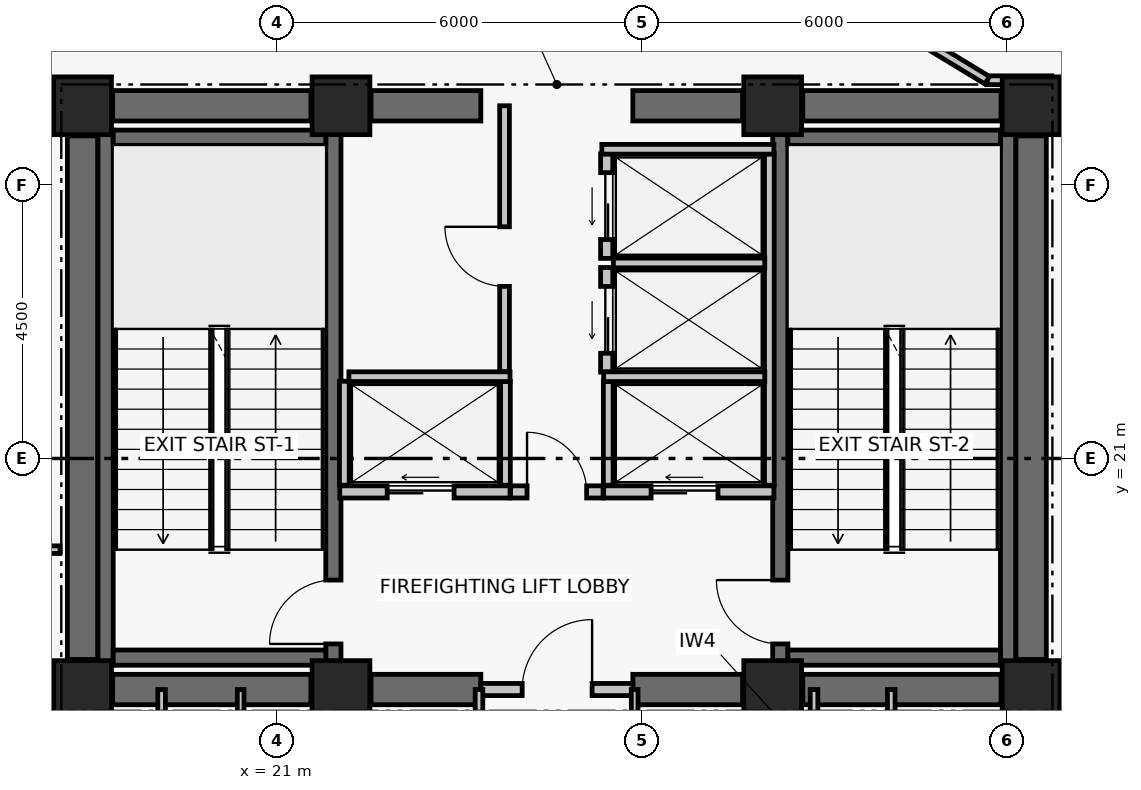
"""IFC4 building model, lengths in metres.
Left out: names, types, materials, properties, quantities, classifications, styles, units other than length and angle.
Written with IfcOpenShell. Run it as: python <this file> out.ifc"""

import sys

from ifc_helpers import new_model, si_unit, direction, frame, frame_2d, origin, origin_2d, place, context, subcontext, project, spatial, rectangle, extrude, element, fill, save


model = new_model("IFC4")
c1 = context("Model", 3, precision=1e-05, world=origin(), true_north=direction((0.0, 1.0)))
c2 = subcontext(c1, "Body", "Model", "MODEL_VIEW")
j1 = project(units=[si_unit("LENGTHUNIT", "METRE"), si_unit("PLANEANGLEUNIT", "RADIAN")], contexts=[c1])
p1 = place(None, origin())
s1 = spatial("IfcSite", under=j1, at=p1, CompositionType="ELEMENT")
p2 = place(p1, origin())
s2 = spatial("IfcBuilding", under=s1, at=p2, CompositionType="ELEMENT")
p3 = place(p2, frame((0.0, 0.0, 184.08)))
s3 = spatial("IfcBuildingStorey", under=s2, at=p3, CompositionType="ELEMENT", Elevation=184.08)
for number, where, z_axis, x_axis in (
    (1, (17.8, 17.2, 0.0), (0.0, 0.0, 1.0), (1.0, 0.0, 0.0)),
    (2, (22.05, 17.2, 0.0), (0.0, 0.0, 1.0), (1.0, 0.0, 0.0)),
    (3, (29.15, 17.2, 0.0), (0.0, 0.0, 1.0), (1.0, 0.0, 0.0)),
    (4, (33.4, 17.2, 0.0), (0.0, 0.0, 1.0), (1.0, 0.0, 0.0)),
    (5, (17.8, 26.8, 0.0), (0.0, 0.0, 1.0), (1.0, 0.0, 0.0)),
    (6, (22.05, 26.8, 0.0), (0.0, 0.0, 1.0), (1.0, 0.0, 0.0)),
    (7, (29.15, 26.8, 0.0), (0.0, 0.0, 1.0), (1.0, 0.0, 0.0)),
    (8, (33.4, 26.8, 0.0), (0.0, 0.0, 1.0), (1.0, 0.0, 0.0)),
):
    element("IfcColumn", number, at=place(p3, frame(where, z_axis=z_axis, x_axis=x_axis)), inside=s3, PredefinedType="COLUMN", context=c2, shape_type="SweptSolid", body=[
        extrude(rectangle(XDim=0.95, YDim=0.95, at=origin_2d()), origin(), (0.0, 0.0, 1.0), 3.72),
    ])
p4 = place(p3, frame((18.295, 17.2, 0.0), z_axis=(0.0, 0.0, 1.0), x_axis=(1.0, 0.0, 0.0)))
e9 = element("IfcWall", 9, at=p4, inside=s3, PredefinedType="SHEAR", context=c2, shape_type="SweptSolid", body=[
    extrude(rectangle(XDim=3.26, YDim=0.5, at=frame_2d((1.63, 0.0))), origin(), (0.0, 0.0, 1.0), 3.5),
])
p5 = place(p3, frame((22.545, 17.2, 0.0), z_axis=(0.0, 0.0, 1.0), x_axis=(1.0, 0.0, 0.0)))
e10 = element("IfcWall", 10, at=p5, inside=s3, PredefinedType="SHEAR", context=c2, shape_type="SweptSolid", body=[
    extrude(rectangle(XDim=1.805, YDim=0.5, at=frame_2d((0.903, 0.0))), origin(), (0.0, 0.0, 1.0), 3.5),
])
p6 = place(p3, frame((26.85, 17.2, 0.0), z_axis=(0.0, 0.0, 1.0), x_axis=(1.0, 0.0, 0.0)))
e11 = element("IfcWall", 11, at=p6, inside=s3, PredefinedType="SHEAR", context=c2, shape_type="SweptSolid", body=[
    extrude(rectangle(XDim=1.805, YDim=0.5, at=frame_2d((0.902, 0.0))), origin(), (0.0, 0.0, 1.0), 3.5),
])
for number, where, z_axis, x_axis in (
    (12, (29.645, 17.2, 0.0), (0.0, 0.0, 1.0), (1.0, 0.0, 0.0)),
    (13, (18.295, 26.8, 0.0), (0.0, 0.0, 1.0), (1.0, 0.0, 0.0)),
):
    element("IfcWall", number, at=place(p3, frame(where, z_axis=z_axis, x_axis=x_axis)), inside=s3, PredefinedType="SHEAR", context=c2, shape_type="SweptSolid", body=[
        extrude(rectangle(XDim=3.26, YDim=0.5, at=frame_2d((1.63, 0.0))), origin(), (0.0, 0.0, 1.0), 3.5),
    ])
p7 = place(p3, frame((22.545, 26.8, 0.0), z_axis=(0.0, 0.0, 1.0), x_axis=(1.0, 0.0, 0.0)))
e14 = element("IfcWall", 14, at=p7, inside=s3, PredefinedType="SHEAR", context=c2, shape_type="SweptSolid", body=[
    extrude(rectangle(XDim=1.805, YDim=0.5, at=frame_2d((0.903, 0.0))), origin(), (0.0, 0.0, 1.0), 3.5),
])
p8 = place(p3, frame((26.85, 26.8, 0.0), z_axis=(0.0, 0.0, 1.0), x_axis=(1.0, 0.0, 0.0)))
e15 = element("IfcWall", 15, at=p8, inside=s3, PredefinedType="SHEAR", context=c2, shape_type="SweptSolid", body=[
    extrude(rectangle(XDim=1.805, YDim=0.5, at=frame_2d((0.902, 0.0))), origin(), (0.0, 0.0, 1.0), 3.5),
])
p9 = place(p3, frame((29.645, 26.8, 0.0), z_axis=(0.0, 0.0, 1.0), x_axis=(1.0, 0.0, 0.0)))
e16 = element("IfcWall", 16, at=p9, inside=s3, PredefinedType="SHEAR", context=c2, shape_type="SweptSolid", body=[
    extrude(rectangle(XDim=3.26, YDim=0.5, at=frame_2d((1.63, 0.0))), origin(), (0.0, 0.0, 1.0), 3.5),
])
for number, where, z_axis, x_axis in (
    (17, (17.8, 17.695, 0.0), (0.0, 0.0, 1.0), (0.0, 1.0, 0.0)),
    (18, (33.4, 17.695, 0.0), (0.0, 0.0, 1.0), (0.0, 1.0, 0.0)),
):
    element("IfcWall", number, at=place(p3, frame(where, z_axis=z_axis, x_axis=x_axis)), inside=s3, PredefinedType="SHEAR", context=c2, shape_type="SweptSolid", body=[
        extrude(rectangle(XDim=8.61, YDim=0.5, at=frame_2d((4.305, 0.0))), origin(), (0.0, 0.0, 1.0), 3.5),
    ])
p10 = place(p3, frame((18.179, 17.6, 0.0), z_axis=(0.0, 0.0, 1.0), x_axis=(0.0, 1.0, 0.0)))
e19 = element("IfcWall", 19, at=p10, inside=s3, PredefinedType="SHEAR", context=c2, shape_type="SweptSolid", body=[
    extrude(rectangle(XDim=8.8, YDim=0.25, at=frame_2d((4.4, 0.0))), origin(), (0.0, 0.0, 1.0), 3.5),
])
p11 = place(p3, frame((21.925, 17.6, 0.0), z_axis=(0.0, 0.0, 1.0), x_axis=(0.0, 1.0, 0.0)))
e20 = element("IfcWall", 20, at=p11, inside=s3, PredefinedType="SHEAR", context=c2, shape_type="SweptSolid", body=[
    extrude(rectangle(XDim=8.8, YDim=0.25, at=frame_2d((4.4, 0.0))), origin(), (0.0, 0.0, 1.0), 3.5),
])
p12 = place(p11, frame((0.35, 0.0, 0.0)))
e21 = element("IfcOpeningElement", 21, at=p12, cuts=e20, PredefinedType="OPENING", context=c2, shape_type="SweptSolid", body=[
    extrude(rectangle(XDim=1.05, YDim=2.08, at=frame_2d((0.525, 1.04))), frame((0.0, 0.135, 0.0), z_axis=(0.0, -1.0, 0.0), x_axis=(1.0, 0.0, 0.0)), (0.0, 0.0, 1.0), 0.27),
])
for number, where, z_axis, x_axis in (
    (22, (18.304, 17.725, 0.0), (0.0, 0.0, 1.0), (1.0, 0.0, 0.0)),
    (23, (18.304, 26.275, 0.0), (0.0, 0.0, 1.0), (1.0, 0.0, 0.0)),
):
    element("IfcWall", number, at=place(p3, frame(where, z_axis=z_axis, x_axis=x_axis)), inside=s3, PredefinedType="SHEAR", context=c2, shape_type="SweptSolid", body=[
        extrude(rectangle(XDim=3.496, YDim=0.25, at=frame_2d((1.748, 0.0))), origin(), (0.0, 0.0, 1.0), 3.5),
    ])
p13 = place(p3, frame((29.275, 17.6, 0.0), z_axis=(0.0, 0.0, 1.0), x_axis=(0.0, 1.0, 0.0)))
e24 = element("IfcWall", 24, at=p13, inside=s3, PredefinedType="SHEAR", context=c2, shape_type="SweptSolid", body=[
    extrude(rectangle(XDim=8.8, YDim=0.25, at=frame_2d((4.4, 0.0))), origin(), (0.0, 0.0, 1.0), 3.5),
])
p14 = place(p13, frame((0.35, 0.0, 0.0)))
e25 = element("IfcOpeningElement", 25, at=p14, cuts=e24, PredefinedType="OPENING", context=c2, shape_type="SweptSolid", body=[
    extrude(rectangle(XDim=1.05, YDim=2.08, at=frame_2d((0.525, 1.04))), frame((0.0, 0.135, 0.0), z_axis=(0.0, -1.0, 0.0), x_axis=(1.0, 0.0, 0.0)), (0.0, 0.0, 1.0), 0.27),
])
p15 = place(p3, frame((33.021, 17.6, 0.0), z_axis=(0.0, 0.0, 1.0), x_axis=(0.0, 1.0, 0.0)))
e26 = element("IfcWall", 26, at=p15, inside=s3, PredefinedType="SHEAR", context=c2, shape_type="SweptSolid", body=[
    extrude(rectangle(XDim=8.8, YDim=0.25, at=frame_2d((4.4, 0.0))), origin(), (0.0, 0.0, 1.0), 3.5),
])
for number, where, z_axis, x_axis in (
    (27, (29.4, 17.725, 0.0), (0.0, 0.0, 1.0), (1.0, 0.0, 0.0)),
    (28, (29.4, 26.275, 0.0), (0.0, 0.0, 1.0), (1.0, 0.0, 0.0)),
):
    element("IfcWall", number, at=place(p3, frame(where, z_axis=z_axis, x_axis=x_axis)), inside=s3, PredefinedType="SHEAR", context=c2, shape_type="SweptSolid", body=[
        extrude(rectangle(XDim=3.496, YDim=0.25, at=frame_2d((1.748, 0.0))), origin(), (0.0, 0.0, 1.0), 3.5),
    ])
p16 = place(p3, frame((24.35, 17.2, 0.0), z_axis=(0.0, 0.0, 1.0), x_axis=(1.0, 0.0, 0.0)))
e29 = element("IfcWall", 29, at=p16, inside=s3, PredefinedType="PARTITIONING", context=c2, shape_type="SweptSolid", body=[
    extrude(rectangle(XDim=2.5, YDim=0.2, at=frame_2d((1.25, 0.0))), origin(), (0.0, 0.0, 1.0), 2.63),
])
p17 = place(p16, frame((0.68, 0.0, 0.0)))
e30 = element("IfcOpeningElement", 30, at=p17, cuts=e29, PredefinedType="OPENING", context=c2, shape_type="SweptSolid", body=[
    extrude(rectangle(XDim=1.15, YDim=2.08, at=frame_2d((0.575, 1.04))), frame((0.0, 0.11, 0.0), z_axis=(0.0, -1.0, 0.0), x_axis=(1.0, 0.0, 0.0)), (0.0, 0.0, 1.0), 0.22),
])
p18 = place(p3, frame((24.84, 20.45, 0.0), z_axis=(0.0, 0.0, 1.0), x_axis=(1.0, 0.0, 0.0)))
e31 = element("IfcWall", 31, at=p18, inside=s3, PredefinedType="PARTITIONING", context=c2, shape_type="SweptSolid", body=[
    extrude(rectangle(XDim=1.52, YDim=0.2, at=frame_2d((0.76, 0.0))), origin(), (0.0, 0.0, 1.0), 3.5),
])
p19 = place(p18, frame((0.27, 0.0, 0.0)))
e32 = element("IfcOpeningElement", 32, at=p19, cuts=e31, PredefinedType="OPENING", context=c2, shape_type="SweptSolid", body=[
    extrude(rectangle(XDim=0.98, YDim=2.06, at=frame_2d((0.49, 1.03))), frame((0.0, 0.11, 0.0), z_axis=(0.0, -1.0, 0.0), x_axis=(1.0, 0.0, 0.0)), (0.0, 0.0, 1.0), 0.22),
])
p20 = place(p3, frame((22.03, 20.45, 0.0), z_axis=(0.0, 0.0, 1.0), x_axis=(1.0, 0.0, 0.0)))
e33 = element("IfcWall", 33, at=p20, inside=s3, PredefinedType="PARTITIONING", context=c2, shape_type="SweptSolid", body=[
    extrude(rectangle(XDim=2.8, YDim=0.2, at=frame_2d((1.4, 0.0))), origin(), (0.0, 0.0, 1.0), 3.5),
])
p21 = place(p20, frame((0.78, 0.0, 0.0)))
e34 = element("IfcOpeningElement", 34, at=p21, cuts=e33, PredefinedType="OPENING", context=c2, shape_type="SweptSolid", body=[
    extrude(rectangle(XDim=1.1, YDim=2.08, at=frame_2d((0.55, 1.04))), frame((0.0, 0.11, 0.0), z_axis=(0.0, -1.0, 0.0), x_axis=(1.0, 0.0, 0.0)), (0.0, 0.0, 1.0), 0.22),
])
p22 = place(p3, frame((26.37, 20.45, 0.0), z_axis=(0.0, 0.0, 1.0), x_axis=(1.0, 0.0, 0.0)))
e35 = element("IfcWall", 35, at=p22, inside=s3, PredefinedType="PARTITIONING", context=c2, shape_type="SweptSolid", body=[
    extrude(rectangle(XDim=2.8, YDim=0.2, at=frame_2d((1.4, 0.0))), origin(), (0.0, 0.0, 1.0), 3.5),
])
p23 = place(p22, frame((0.78, 0.0, 0.0)))
e36 = element("IfcOpeningElement", 36, at=p23, cuts=e35, PredefinedType="OPENING", context=c2, shape_type="SweptSolid", body=[
    extrude(rectangle(XDim=1.1, YDim=2.08, at=frame_2d((0.55, 1.04))), frame((0.0, 0.11, 0.0), z_axis=(0.0, -1.0, 0.0), x_axis=(1.0, 0.0, 0.0)), (0.0, 0.0, 1.0), 0.22),
])
p24 = place(p3, frame((26.42, 22.42, 0.0), z_axis=(0.0, 0.0, 1.0), x_axis=(0.0, 1.0, 0.0)))
e37 = element("IfcWall", 37, at=p24, inside=s3, PredefinedType="PARTITIONING", context=c2, shape_type="SweptSolid", body=[
    extrude(rectangle(XDim=1.72, YDim=0.2, at=frame_2d((0.86, 0.0))), origin(), (0.0, 0.0, 1.0), 3.5),
])
p25 = place(p24, frame((0.31, 0.0, 0.0)))
e38 = element("IfcOpeningElement", 38, at=p25, cuts=e37, PredefinedType="OPENING", context=c2, shape_type="SweptSolid", body=[
    extrude(rectangle(XDim=1.1, YDim=2.08, at=frame_2d((0.55, 1.04))), frame((0.0, 0.11, 0.0), z_axis=(0.0, -1.0, 0.0), x_axis=(1.0, 0.0, 0.0)), (0.0, 0.0, 1.0), 0.22),
])
p26 = place(p3, frame((26.42, 24.29, 0.0), z_axis=(0.0, 0.0, 1.0), x_axis=(0.0, 1.0, 0.0)))
e39 = element("IfcWall", 39, at=p26, inside=s3, PredefinedType="PARTITIONING", context=c2, shape_type="SweptSolid", body=[
    extrude(rectangle(XDim=1.72, YDim=0.2, at=frame_2d((0.86, 0.0))), origin(), (0.0, 0.0, 1.0), 3.5),
])
p27 = place(p26, frame((0.31, 0.0, 0.0)))
e40 = element("IfcOpeningElement", 40, at=p27, cuts=e39, PredefinedType="OPENING", context=c2, shape_type="SweptSolid", body=[
    extrude(rectangle(XDim=1.1, YDim=2.08, at=frame_2d((0.55, 1.04))), frame((0.0, 0.11, 0.0), z_axis=(0.0, -1.0, 0.0), x_axis=(1.0, 0.0, 0.0)), (0.0, 0.0, 1.0), 0.22),
])
for number, where, z_axis, x_axis in (
    (41, (22.105, 20.56, 0.0), (0.0, 0.0, 1.0), (0.0, 1.0, 0.0)),
    (42, (24.755, 20.56, 0.0), (0.0, 0.0, 1.0), (0.0, 1.0, 0.0)),
):
    element("IfcWall", number, at=place(p3, frame(where, z_axis=z_axis, x_axis=x_axis)), inside=s3, PredefinedType="PARTITIONING", context=c2, shape_type="SweptSolid", body=[
        extrude(rectangle(XDim=1.71, YDim=0.16, at=frame_2d((0.855, 0.0))), origin(), (0.0, 0.0, 1.0), 3.5),
    ])
p28 = place(p3, frame((22.18, 22.345, 0.0), z_axis=(0.0, 0.0, 1.0), x_axis=(1.0, 0.0, 0.0)))
e43 = element("IfcWall", 43, at=p28, inside=s3, PredefinedType="PARTITIONING", context=c2, shape_type="SweptSolid", body=[
    extrude(rectangle(XDim=2.65, YDim=0.16, at=frame_2d((1.325, 0.0))), origin(), (0.0, 0.0, 1.0), 3.5),
])
p29 = place(p3, frame((29.095, 20.56, 0.0), z_axis=(0.0, 0.0, 1.0), x_axis=(0.0, 1.0, 0.0)))
e44 = element("IfcWall", 44, at=p29, inside=s3, PredefinedType="PARTITIONING", context=c2, shape_type="SweptSolid", body=[
    extrude(rectangle(XDim=5.45, YDim=0.16, at=frame_2d((2.725, 0.0))), origin(), (0.0, 0.0, 1.0), 3.5),
])
p30 = place(p3, frame((26.445, 20.56, 0.0), z_axis=(0.0, 0.0, 1.0), x_axis=(0.0, 1.0, 0.0)))
e45 = element("IfcWall", 45, at=p30, inside=s3, PredefinedType="PARTITIONING", context=c2, shape_type="SweptSolid", body=[
    extrude(rectangle(XDim=1.71, YDim=0.16, at=frame_2d((0.855, 0.0))), origin(), (0.0, 0.0, 1.0), 3.5),
])
p31 = place(p3, frame((26.37, 22.345, 0.0), z_axis=(0.0, 0.0, 1.0), x_axis=(1.0, 0.0, 0.0)))
e46 = element("IfcWall", 46, at=p31, inside=s3, PredefinedType="PARTITIONING", context=c2, shape_type="SweptSolid", body=[
    extrude(rectangle(XDim=2.65, YDim=0.16, at=frame_2d((1.325, 0.0))), origin(), (0.0, 0.0, 1.0), 3.5),
])
p32 = place(p3, frame((26.53, 24.215, 0.0), z_axis=(0.0, 0.0, 1.0), x_axis=(1.0, 0.0, 0.0)))
e47 = element("IfcWall", 47, at=p32, inside=s3, PredefinedType="PARTITIONING", context=c2, shape_type="SweptSolid", body=[
    extrude(rectangle(XDim=2.49, YDim=0.16, at=frame_2d((1.245, 0.0))), origin(), (0.0, 0.0, 1.0), 3.5),
])
p33 = place(p3, frame((26.34, 26.085, 0.0), z_axis=(0.0, 0.0, 1.0), x_axis=(1.0, 0.0, 0.0)))
e48 = element("IfcWall", 48, at=p33, inside=s3, PredefinedType="PARTITIONING", context=c2, shape_type="SweptSolid", body=[
    extrude(rectangle(XDim=2.83, YDim=0.16, at=frame_2d((1.415, 0.0))), origin(), (0.0, 0.0, 1.0), 3.5),
])
p34 = place(p3, frame((24.74, 22.43, 0.0), z_axis=(0.0, 0.0, 1.0), x_axis=(0.0, 1.0, 0.0)))
e49 = element("IfcWall", 49, at=p34, inside=s3, PredefinedType="PARTITIONING", context=c2, shape_type="SweptSolid", body=[
    extrude(rectangle(XDim=4.37, YDim=0.16, at=frame_2d((2.185, 0.0))), origin(), (0.0, 0.0, 1.0), 2.63),
])
p35 = place(p34, frame((1.4, 0.0, 0.0)))
e50 = element("IfcOpeningElement", 50, at=p35, cuts=e49, PredefinedType="OPENING", context=c2, shape_type="SweptSolid", body=[
    extrude(rectangle(XDim=0.98, YDim=2.06, at=frame_2d((0.49, 1.03))), frame((0.0, 0.09, 0.0), z_axis=(0.0, -1.0, 0.0), x_axis=(1.0, 0.0, 0.0)), (0.0, 0.0, 1.0), 0.18),
])
p36 = place(p3, frame((19.1, 14.95, 0.0), z_axis=(0.0, 0.0, 1.0), x_axis=(0.0, 1.0, 0.0)))
e51 = element("IfcWall", 51, at=p36, inside=s3, PredefinedType="PARTITIONING", context=c2, shape_type="SweptSolid", body=[
    extrude(rectangle(XDim=2.25, YDim=0.125, at=frame_2d((1.125, 0.0))), origin(), (0.0, 0.0, 1.0), 2.63),
])
p37 = place(p3, frame((20.4, 14.95, 0.0), z_axis=(0.0, 0.0, 1.0), x_axis=(0.0, 1.0, 0.0)))
e52 = element("IfcWall", 52, at=p37, inside=s3, PredefinedType="PARTITIONING", context=c2, shape_type="SweptSolid", body=[
    extrude(rectangle(XDim=2.25, YDim=0.11, at=frame_2d((1.125, 0.0))), origin(), (0.0, 0.0, 1.0), 2.63),
])
for number, where, z_axis, x_axis in (
    (53, (22.36, 14.95, 0.0), (0.0, 0.0, 1.0), (0.0, 1.0, 0.0)),
    (54, (24.32, 14.95, 0.0), (0.0, 0.0, 1.0), (0.0, 1.0, 0.0)),
):
    element("IfcWall", number, at=place(p3, frame(where, z_axis=z_axis, x_axis=x_axis)), inside=s3, PredefinedType="PARTITIONING", context=c2, shape_type="SweptSolid", body=[
        extrude(rectangle(XDim=2.25, YDim=0.125, at=frame_2d((1.125, 0.0))), origin(), (0.0, 0.0, 1.0), 2.63),
    ])
p38 = place(p3, frame((26.88, 14.95, 0.0), z_axis=(0.0, 0.0, 1.0), x_axis=(0.0, 1.0, 0.0)))
e55 = element("IfcWall", 55, at=p38, inside=s3, PredefinedType="PARTITIONING", context=c2, shape_type="SweptSolid", body=[
    extrude(rectangle(XDim=2.25, YDim=0.11, at=frame_2d((1.125, 0.0))), origin(), (0.0, 0.0, 1.0), 2.63),
])
for number, where, z_axis, x_axis in (
    (56, (29.83, 14.95, 0.0), (0.0, 0.0, 1.0), (0.0, 1.0, 0.0)),
    (57, (31.1, 14.95, 0.0), (0.0, 0.0, 1.0), (0.0, 1.0, 0.0)),
):
    element("IfcWall", number, at=place(p3, frame(where, z_axis=z_axis, x_axis=x_axis)), inside=s3, PredefinedType="PARTITIONING", context=c2, shape_type="SweptSolid", body=[
        extrude(rectangle(XDim=2.25, YDim=0.125, at=frame_2d((1.125, 0.0))), origin(), (0.0, 0.0, 1.0), 2.63),
    ])
p39 = place(p3, frame((33.74, 27.22, 0.0), z_axis=(0.0, 0.0, 1.0), x_axis=(-1.0, 0.0, 0.0)))
e58 = element("IfcWall", 58, at=p39, inside=s3, PredefinedType="PARTITIONING", context=c2, shape_type="SweptSolid", body=[
    extrude(rectangle(XDim=1.062, YDim=0.145, at=frame_2d((0.531, 0.0))), origin(), (0.0, 0.0, 1.0), 2.63),
])
p40 = place(p3, frame((32.677, 27.22, 0.0), z_axis=(0.0, 0.0, 1.0), x_axis=(-0.854662977584, 0.519183199601, 0.0)))
e59 = element("IfcWall", 59, at=p40, inside=s3, PredefinedType="PARTITIONING", context=c2, shape_type="SweptSolid", body=[
    extrude(rectangle(XDim=2.982, YDim=0.145, at=frame_2d((1.491, 0.0))), origin(), (0.0, 0.0, 1.0), 2.63),
])
p41 = place(p3, frame((15.2, 27.06, 0.0), z_axis=(0.0, 0.0, 1.0), x_axis=(1.0, 0.0, 0.0)))
e60 = element("IfcWall", 60, at=p41, inside=s3, PredefinedType="PARTITIONING", context=c2, shape_type="SweptSolid", body=[
    extrude(rectangle(XDim=2.18, YDim=0.145, at=frame_2d((1.09, 0.0))), origin(), (0.0, 0.0, 1.0), 2.73),
])
p42 = place(p3, frame((12.01, 19.5, 0.0), z_axis=(0.0, 0.0, 1.0), x_axis=(1.0, 0.0, 0.0)))
e61 = element("IfcWall", 61, at=p42, inside=s3, PredefinedType="PARTITIONING", context=c2, shape_type="SweptSolid", body=[
    extrude(rectangle(XDim=5.42, YDim=0.125, at=frame_2d((2.71, 0.0))), origin(), (0.0, 0.0, 1.0), 2.63),
])
p43 = place(p3, frame((33.77, 27.0, 0.0), z_axis=(0.0, 0.0, 1.0), x_axis=(1.0, 0.0, 0.0)))
e62 = element("IfcWall", 62, at=p43, inside=s3, PredefinedType="PARTITIONING", context=c2, shape_type="SweptSolid", body=[
    extrude(rectangle(XDim=2.359, YDim=0.095, at=frame_2d((1.18, 0.0))), origin(), (0.0, 0.0, 1.0), 3.5),
])
p44 = place(p12, origin())
e63 = element("IfcDoor", 63, at=p44, inside=s3, OperationType="SINGLE_SWING_LEFT", PredefinedType="DOOR", context=c2, shape_type="SweptSolid", body=[
    extrude(rectangle(XDim=1.05, YDim=2.08, at=frame_2d((0.525, 1.04))), frame((0.0, 0.025, 0.0), z_axis=(0.0, -1.0, 0.0), x_axis=(1.0, 0.0, 0.0)), (0.0, 0.0, 1.0), 0.05),
])
fill(e21, e63)
p45 = place(p14, origin())
e64 = element("IfcDoor", 64, at=p45, inside=s3, OperationType="SINGLE_SWING_RIGHT", PredefinedType="DOOR", context=c2, shape_type="SweptSolid", body=[
    extrude(rectangle(XDim=1.05, YDim=2.08, at=frame_2d((0.525, 1.04))), frame((0.0, 0.025, 0.0), z_axis=(0.0, -1.0, 0.0), x_axis=(1.0, 0.0, 0.0)), (0.0, 0.0, 1.0), 0.05),
])
fill(e25, e64)
p46 = place(p17, origin())
e65 = element("IfcDoor", 65, at=p46, inside=s3, OperationType="SINGLE_SWING_RIGHT", PredefinedType="DOOR", context=c2, shape_type="SweptSolid", body=[
    extrude(rectangle(XDim=1.15, YDim=2.08, at=frame_2d((0.575, 1.04))), frame((0.0, 0.025, 0.0), z_axis=(0.0, -1.0, 0.0), x_axis=(1.0, 0.0, 0.0)), (0.0, 0.0, 1.0), 0.05),
])
fill(e30, e65)
p47 = place(p19, origin())
e66 = element("IfcDoor", 66, at=p47, inside=s3, OperationType="SINGLE_SWING_LEFT", PredefinedType="DOOR", context=c2, shape_type="SweptSolid", body=[
    extrude(rectangle(XDim=0.98, YDim=2.06, at=frame_2d((0.49, 1.03))), frame((0.0, 0.025, 0.0), z_axis=(0.0, -1.0, 0.0), x_axis=(1.0, 0.0, 0.0)), (0.0, 0.0, 1.0), 0.05),
])
fill(e32, e66)
p48 = place(p21, origin())
e67 = element("IfcDoor", 67, at=p48, inside=s3, OperationType="DOUBLE_DOOR_SLIDING", PredefinedType="DOOR", context=c2, shape_type="SweptSolid", body=[
    extrude(rectangle(XDim=1.1, YDim=2.08, at=frame_2d((0.55, 1.04))), frame((0.0, 0.025, 0.0), z_axis=(0.0, -1.0, 0.0), x_axis=(1.0, 0.0, 0.0)), (0.0, 0.0, 1.0), 0.05),
])
fill(e34, e67)
p49 = place(p23, origin())
e68 = element("IfcDoor", 68, at=p49, inside=s3, OperationType="DOUBLE_DOOR_SLIDING", PredefinedType="DOOR", context=c2, shape_type="SweptSolid", body=[
    extrude(rectangle(XDim=1.1, YDim=2.08, at=frame_2d((0.55, 1.04))), frame((0.0, 0.025, 0.0), z_axis=(0.0, -1.0, 0.0), x_axis=(1.0, 0.0, 0.0)), (0.0, 0.0, 1.0), 0.05),
])
fill(e36, e68)
p50 = place(p25, origin())
e69 = element("IfcDoor", 69, at=p50, inside=s3, OperationType="DOUBLE_DOOR_SLIDING", PredefinedType="DOOR", context=c2, shape_type="SweptSolid", body=[
    extrude(rectangle(XDim=1.1, YDim=2.08, at=frame_2d((0.55, 1.04))), frame((0.0, 0.025, 0.0), z_axis=(0.0, -1.0, 0.0), x_axis=(1.0, 0.0, 0.0)), (0.0, 0.0, 1.0), 0.05),
])
fill(e38, e69)
p51 = place(p27, origin())
e70 = element("IfcDoor", 70, at=p51, inside=s3, OperationType="DOUBLE_DOOR_SLIDING", PredefinedType="DOOR", context=c2, shape_type="SweptSolid", body=[
    extrude(rectangle(XDim=1.1, YDim=2.08, at=frame_2d((0.55, 1.04))), frame((0.0, 0.025, 0.0), z_axis=(0.0, -1.0, 0.0), x_axis=(1.0, 0.0, 0.0)), (0.0, 0.0, 1.0), 0.05),
])
fill(e40, e70)
p52 = place(p35, origin())
e71 = element("IfcDoor", 71, at=p52, inside=s3, OperationType="SINGLE_SWING_RIGHT", PredefinedType="DOOR", context=c2, shape_type="SweptSolid", body=[
    extrude(rectangle(XDim=0.98, YDim=2.06, at=frame_2d((0.49, 1.03))), frame((0.0, 0.025, 0.0), z_axis=(0.0, -1.0, 0.0), x_axis=(1.0, 0.0, 0.0)), (0.0, 0.0, 1.0), 0.05),
])
fill(e50, e71)
save(model, sys.argv[1])
